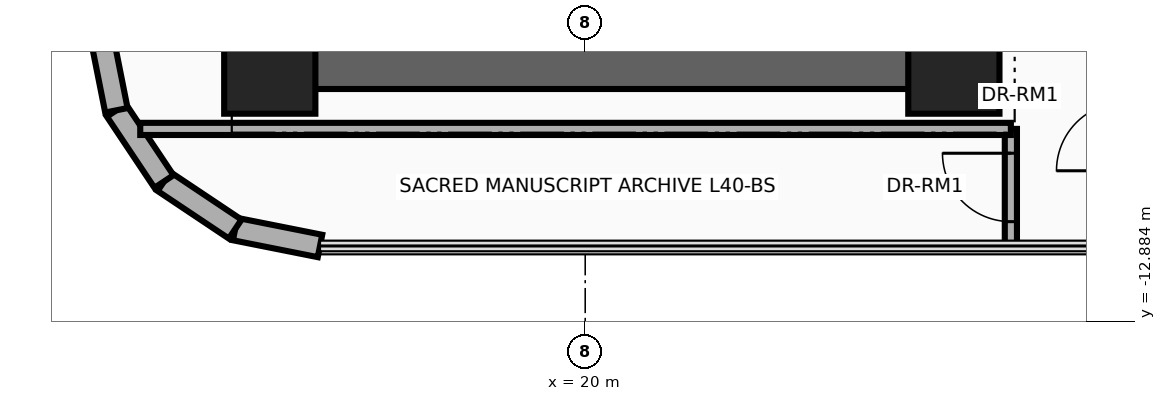
"""IFC4 building model, lengths in metres.
Left out: names, types, materials, properties, quantities, classifications, styles, units other than length and angle.
Written with IfcOpenShell. Run it as: python <this file> out.ifc"""

import sys

from ifc_helpers import new_model, si_unit, direction, frame, frame_2d, origin, origin_2d, place, context, subcontext, project, spatial, rectangle, extrude, source, transform, mapped, element, fill, save


model = new_model("IFC4")
c1 = context("Model", 3, precision=1e-05, world=origin(), true_north=direction((0.0, 1.0)))
c2 = subcontext(c1, "Body", "Model", "MODEL_VIEW")
j1 = project(units=[si_unit("LENGTHUNIT", "METRE"), si_unit("PLANEANGLEUNIT", "RADIAN")], contexts=[c1])
p1 = place(None, origin())
s1 = spatial("IfcSite", under=j1, at=p1, CompositionType="ELEMENT")
p2 = place(p1, origin())
s2 = spatial("IfcBuilding", under=s1, at=p2, CompositionType="ELEMENT")
p3 = place(p2, frame((0.0, 0.0, 157.5)))
s3 = spatial("IfcBuildingStorey", under=s2, at=p3, CompositionType="ELEMENT", Elevation=157.5)
p4 = place(p3, frame((24.85, -9.825, 0.0), z_axis=(0.0, 0.0, 1.0), x_axis=(0.0, 1.0, 0.0)))
e1 = element("IfcWall", 1, at=p4, inside=s3, PredefinedType="SHEAR", context=c2, shape_type="SweptSolid", body=[
    extrude(rectangle(XDim=8.875, YDim=0.55, at=frame_2d((4.438, 0.0))), origin(), (0.0, 0.0, 1.0), 3.46),
])
p5 = place(p3, frame((15.85, -9.55, 0.0), z_axis=(0.0, 0.0, 1.0), x_axis=(1.0, 0.0, 0.0)))
e2 = element("IfcWall", 2, at=p5, inside=s3, PredefinedType="SHEAR", context=c2, shape_type="SweptSolid", body=[
    extrude(rectangle(XDim=9.0, YDim=0.55, at=frame_2d((4.5, 0.0))), origin(), (0.0, 0.0, 1.0), 3.46),
])
m1 = source(origin(), c2, "Body", "SweptSolid", [
    extrude(rectangle(XDim=1.2, YDim=1.2, at=origin_2d()), origin(), (0.0, 0.0, 1.0), 3.7),
])
for number, where, z_axis, x_axis in (
    (3, (15.85, -9.55, 0.0), (0.0, 0.0, 1.0), (1.0, 0.0, 0.0)),
    (4, (24.85, -9.55, 0.0), (0.0, 0.0, 1.0), (1.0, 0.0, 0.0)),
):
    element("IfcColumn", number, at=place(p3, frame(where, z_axis=z_axis, x_axis=x_axis)), inside=s3, PredefinedType="COLUMN", context=c2, shape_type="MappedRepresentation", body=[
        mapped(m1, transform((0.0, 0.0, 0.0), x_axis=(1.0, 0.0, 0.0), y_axis=(0.0, 1.0, 0.0), z_axis=(0.0, 0.0, 1.0), scale=1.0)),
    ])
p6 = place(p3, frame((16.511, -11.89, 0.0), z_axis=(0.0, 0.0, 1.0), x_axis=(-0.980794657743, 0.195043173023, 0.0)))
e5 = element("IfcWall", 5, at=p6, inside=s3, PredefinedType="SOLIDWALL", context=c2, shape_type="SweptSolid", body=[
    extrude(rectangle(XDim=1.138, YDim=0.3, at=frame_2d((0.569, 0.0))), origin(), (0.0, 0.0, 1.0), 3.46),
])
for number, where, z_axis, x_axis in (
    (6, (15.395, -11.668, 0.0), (0.0, 0.0, 1.0), (-0.831, 0.556, 0.0)),
    (7, (14.458, -11.042, 0.0), (0.0, 0.0, 1.0), (-0.556, 0.831, 0.0)),
):
    element("IfcWall", number, at=place(p3, frame(where, z_axis=z_axis, x_axis=x_axis)), inside=s3, PredefinedType="SOLIDWALL", context=c2, shape_type="SweptSolid", body=[
        extrude(rectangle(XDim=1.127, YDim=0.3, at=frame_2d((0.563, 0.0))), origin(), (0.0, 0.0, 1.0), 3.46),
    ])
p7 = place(p3, frame((13.832, -10.105, 0.0), z_axis=(0.0, 0.0, 1.0), x_axis=(-0.195043173023, 0.980794657743, 0.0)))
e8 = element("IfcWall", 8, at=p7, inside=s3, PredefinedType="SOLIDWALL", context=c2, shape_type="SweptSolid", body=[
    extrude(rectangle(XDim=1.138, YDim=0.3, at=frame_2d((0.569, 0.0))), origin(), (0.0, 0.0, 1.0), 3.46),
])
p8 = place(p3, frame((25.6, -11.89, 0.0), z_axis=(0.0, 0.0, 1.0), x_axis=(0.0, 1.0, 0.0)))
e9 = element("IfcWall", 9, at=p8, inside=s3, PredefinedType="PARTITIONING", context=c2, shape_type="SweptSolid", body=[
    extrude(rectangle(XDim=1.54, YDim=0.16, at=frame_2d((0.77, 0.0))), origin(), (0.0, 0.0, 1.0), 3.46),
])
p9 = place(p8, frame((0.32, 0.0, 0.0)))
e10 = element("IfcOpeningElement", 10, at=p9, cuts=e9, PredefinedType="OPENING", context=c2, shape_type="SweptSolid", body=[
    extrude(rectangle(XDim=0.9, YDim=2.1, at=frame_2d((0.45, 1.05))), frame((0.0, 0.095, 0.0), z_axis=(0.0, -1.0, 0.0), x_axis=(1.0, 0.0, 0.0)), (0.0, 0.0, 1.0), 0.19),
])
p10 = place(p3, frame((14.146, -10.35, 0.0), z_axis=(0.0, 0.0, 1.0), x_axis=(1.0, 0.0, 0.0)))
e11 = element("IfcWall", 11, at=p10, inside=s3, PredefinedType="PARTITIONING", context=c2, shape_type="SweptSolid", body=[
    extrude(rectangle(XDim=11.454, YDim=0.16, at=frame_2d((5.727, 0.0))), origin(), (0.0, 0.0, 1.0), 3.46),
])
p11 = place(p9, origin())
e12 = element("IfcDoor", 12, at=p11, inside=s3, OperationType="SINGLE_SWING_RIGHT", PredefinedType="DOOR", context=c2, shape_type="SweptSolid", body=[
    extrude(rectangle(XDim=0.9, YDim=2.1, at=frame_2d((0.45, 1.05))), frame((0.0, 0.025, 0.0), z_axis=(0.0, -1.0, 0.0), x_axis=(1.0, 0.0, 0.0)), (0.0, 0.0, 1.0), 0.05),
])
fill(e10, e12)
save(model, sys.argv[1])
